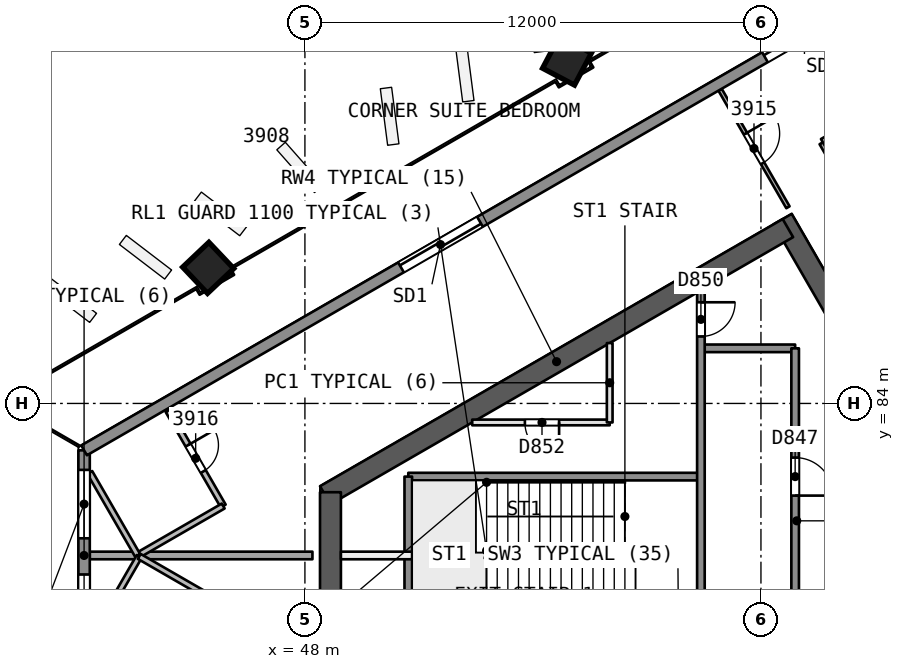
"""IFC4 building model, lengths in metres.
Left out: names, types, materials, properties, quantities, classifications, styles, units other than length and angle.
Written with IfcOpenShell. Run it as: python <this file> out.ifc"""

import sys

from ifc_helpers import new_model, si_unit, direction, frame, frame_2d, origin, origin_2d, place, context, subcontext, project, spatial, rectangle, extrude, element, fill, save


model = new_model("IFC4")
c1 = context("Model", 3, precision=1e-05, world=origin(), true_north=direction((0.0, 1.0)))
c2 = subcontext(c1, "Body", "Model", "MODEL_VIEW")
j1 = project(units=[si_unit("LENGTHUNIT", "METRE"), si_unit("PLANEANGLEUNIT", "RADIAN")], contexts=[c1])
p1 = place(None, origin())
s1 = spatial("IfcSite", under=j1, at=p1, CompositionType="ELEMENT")
p2 = place(p1, origin())
s2 = spatial("IfcBuilding", under=s1, at=p2, CompositionType="ELEMENT")
p3 = place(p2, frame((0.0, 0.0, 163.7)))
s3 = spatial("IfcBuildingStorey", under=s2, at=p3, CompositionType="ELEMENT", Elevation=163.7)
p4 = place(p3, frame((65.682, 80.0, 0.0), z_axis=(0.0, 0.0, 1.0), x_axis=(-0.500000202252, 0.866025287014, 0.0)))
e1 = element("IfcWall", 1, at=p4, inside=s3, PredefinedType="SHEAR", context=c2, shape_type="SweptSolid", body=[
    extrude(rectangle(XDim=10.221, YDim=0.55, at=frame_2d((5.111, 0.0))), origin(), (0.0, 0.0, 1.0), 3.7),
])
p5 = place(p4, frame((0.791, 0.0, 0.0)))
e2 = element("IfcOpeningElement", 2, at=p5, cuts=e1, PredefinedType="OPENING", context=c2, shape_type="SweptSolid", body=[
    extrude(rectangle(XDim=1.2, YDim=2.1, at=frame_2d((0.6, 1.05))), frame((0.0, 0.286, 0.0), z_axis=(0.0, -1.0, 0.0), x_axis=(1.0, 0.0, 0.0)), (0.0, 0.0, 1.0), 0.571),
])
p6 = place(p3, frame((60.709, 88.614, 0.0), z_axis=(0.0, 0.0, 1.0), x_axis=(-0.866020164116, -0.500009075263, 0.0)))
e3 = element("IfcWall", 3, at=p6, inside=s3, PredefinedType="SHEAR", context=c2, shape_type="SweptSolid", body=[
    extrude(rectangle(XDim=14.058, YDim=0.55, at=frame_2d((7.029, 0.0))), origin(), (0.0, 0.0, 1.0), 3.7),
])
p7 = place(p3, frame((48.672, 81.664, 0.0), z_axis=(0.0, 0.0, 1.0), x_axis=(0.0, -1.0, 0.0)))
e4 = element("IfcWall", 4, at=p7, inside=s3, PredefinedType="SHEAR", context=c2, shape_type="SweptSolid", body=[
    extrude(rectangle(XDim=3.487, YDim=0.55, at=frame_2d((1.743, 0.0))), origin(), (0.0, 0.0, 1.0), 3.7),
])
p8 = place(p3, frame((60.709, 71.386, 0.0), z_axis=(0.0, 0.0, 1.0), x_axis=(0.500015938302, 0.866016201606, 0.0)))
e5 = element("IfcWall", 5, at=p8, inside=s3, PredefinedType="SHEAR", context=c2, shape_type="SweptSolid", body=[
    extrude(rectangle(XDim=10.105, YDim=0.55, at=frame_2d((5.053, 0.0))), origin(), (0.0, 0.0, 1.0), 3.7),
])
p9 = place(p8, frame((7.955, 0.0, 0.0)))
e6 = element("IfcOpeningElement", 6, at=p9, cuts=e5, PredefinedType="OPENING", context=c2, shape_type="SweptSolid", body=[
    extrude(rectangle(XDim=1.2, YDim=2.1, at=frame_2d((0.6, 1.05))), frame((0.0, 0.286, 0.0), z_axis=(0.0, -1.0, 0.0), x_axis=(1.0, 0.0, 0.0)), (0.0, 0.0, 1.0), 0.571),
])
p10 = place(p3, frame((54.873, 93.033, 0.0), z_axis=(0.019328516974, -0.012138044789, 0.999739504221), x_axis=(-0.500205614953, 0.865671455024, 0.020181048691)))
e7 = element("IfcColumn", 7, at=p10, inside=s3, PredefinedType="COLUMN", context=c2, shape_type="SweptSolid", body=[
    extrude(rectangle(XDim=0.95, YDim=0.95, at=origin_2d()), origin(), (0.0, 0.0, 1.0), 3.701),
])
p11 = place(p3, frame((45.421, 87.576, 0.0), z_axis=(0.028559101991, -0.006859460986, 0.999568569678), x_axis=(-0.49850746064, 0.866650252321, 0.020190389752)))
e8 = element("IfcColumn", 8, at=p11, inside=s3, PredefinedType="COLUMN", context=c2, shape_type="SweptSolid", body=[
    extrude(rectangle(XDim=0.95, YDim=0.95, at=origin_2d()), origin(), (0.0, 0.0, 1.0), 3.702),
])
p12 = place(p3, frame((58.924, 92.256, 0.0), z_axis=(0.0, 0.0, 1.0), x_axis=(0.4999827131, -0.866035384151, 0.0)))
e9 = element("IfcWall", 9, at=p12, inside=s3, PredefinedType="PARTITIONING", context=c2, shape_type="SweptSolid", body=[
    extrude(rectangle(XDim=3.573, YDim=0.1, at=frame_2d((1.787, 0.0))), origin(), (0.0, 0.0, 1.0), 3.25),
])
p13 = place(p12, frame((1.336, 0.0, 0.0)))
e10 = element("IfcOpeningElement", 10, at=p13, cuts=e9, PredefinedType="OPENING", context=c2, shape_type="SweptSolid", body=[
    extrude(rectangle(XDim=0.9, YDim=2.1, at=frame_2d((0.45, 1.05))), frame((0.0, 0.061, 0.0), z_axis=(0.0, -1.0, 0.0), x_axis=(1.0, 0.0, 0.0)), (0.0, 0.0, 1.0), 0.121),
])
p14 = place(p3, frame((66.129, 83.077, 0.0), z_axis=(0.0, 0.0, 1.0), x_axis=(-0.5000018851, 0.866024315419, 0.0)))
e11 = element("IfcWall", 11, at=p14, inside=s3, PredefinedType="PARTITIONING", context=c2, shape_type="SweptSolid", body=[
    extrude(rectangle(XDim=9.0, YDim=0.2, at=frame_2d((4.5, 0.0))), origin(), (0.0, 0.0, 1.0), 3.25),
])
p15 = place(p3, frame((61.629, 90.871, 0.0), z_axis=(0.0, 0.0, 1.0), x_axis=(0.866041268327, 0.499972520799, 0.0)))
e12 = element("IfcWall", 12, at=p15, inside=s3, PredefinedType="PARTITIONING", context=c2, shape_type="SweptSolid", body=[
    extrude(rectangle(XDim=2.0, YDim=0.2, at=frame_2d((1.0, 0.0))), origin(), (0.0, 0.0, 1.0), 3.25),
])
p16 = place(p3, frame((44.4, 83.812, 0.0), z_axis=(0.0, 0.0, 1.0), x_axis=(0.50005036918, -0.865996321171, 0.0)))
e13 = element("IfcWall", 13, at=p16, inside=s3, PredefinedType="PARTITIONING", context=c2, shape_type="SweptSolid", body=[
    extrude(rectangle(XDim=2.9, YDim=0.15, at=frame_2d((1.45, 0.0))), origin(), (0.0, 0.0, 1.0), 3.25),
])
p17 = place(p16, frame((1.05, 0.0, 0.0)))
e14 = element("IfcOpeningElement", 14, at=p17, cuts=e13, PredefinedType="OPENING", context=c2, shape_type="SweptSolid", body=[
    extrude(rectangle(XDim=0.8, YDim=2.1, at=frame_2d((0.4, 1.05))), frame((0.0, 0.085, 0.0), z_axis=(0.0, -1.0, 0.0), x_axis=(1.0, 0.0, 0.0)), (0.0, 0.0, 1.0), 0.171),
])
p18 = place(p3, frame((45.85, 81.301, 0.0), z_axis=(0.0, 0.0, 1.0), x_axis=(-0.866021400173, -0.500006934395, 0.0)))
e15 = element("IfcWall", 15, at=p18, inside=s3, PredefinedType="PARTITIONING", context=c2, shape_type="SweptSolid", body=[
    extrude(rectangle(XDim=2.6, YDim=0.15, at=frame_2d((1.3, 0.0))), origin(), (0.0, 0.0, 1.0), 3.25),
])
p19 = place(p3, frame((43.598, 80.001, 0.0), z_axis=(0.0, 0.0, 1.0), x_axis=(-0.500024252353, 0.866011401229, 0.0)))
e16 = element("IfcWall", 16, at=p19, inside=s3, PredefinedType="PARTITIONING", context=c2, shape_type="SweptSolid", body=[
    extrude(rectangle(XDim=2.521, YDim=0.15, at=frame_2d((1.26, 0.0))), origin(), (0.0, 0.0, 1.0), 3.25),
])
p20 = place(p3, frame((42.338, 80.0, 0.0), z_axis=(0.0, 0.0, 1.0), x_axis=(1.0, 0.0, 0.0)))
e17 = element("IfcWall", 17, at=p20, inside=s3, PredefinedType="PARTITIONING", context=c2, shape_type="SweptSolid", body=[
    extrude(rectangle(XDim=5.86, YDim=0.2, at=frame_2d((2.93, 0.0))), origin(), (0.0, 0.0, 1.0), 3.25),
])
p21 = place(p3, frame((42.338, 77.718, 0.0), z_axis=(0.0, 0.0, 1.0), x_axis=(0.499998180979, 0.866026453994, 0.0)))
e18 = element("IfcWall", 18, at=p21, inside=s3, PredefinedType="PARTITIONING", context=c2, shape_type="SweptSolid", body=[
    extrude(rectangle(XDim=2.606, YDim=0.15, at=frame_2d((1.303, 0.0))), origin(), (0.0, 0.0, 1.0), 3.25),
])
p22 = place(p3, frame((43.641, 79.975, 0.0), z_axis=(0.0, 0.0, 1.0), x_axis=(0.866021400173, -0.500006934395, 0.0)))
e19 = element("IfcWall", 19, at=p22, inside=s3, PredefinedType="PARTITIONING", context=c2, shape_type="SweptSolid", body=[
    extrude(rectangle(XDim=2.6, YDim=0.15, at=frame_2d((1.3, 0.0))), origin(), (0.0, 0.0, 1.0), 3.25),
])
p23 = place(p3, frame((42.189, 77.234, 0.0), z_axis=(0.0, 0.0, 1.0), x_axis=(0.0, 1.0, 0.0)))
e20 = element("IfcWall", 20, at=p23, inside=s3, PredefinedType="SOLIDWALL", context=c2, shape_type="SweptSolid", body=[
    extrude(rectangle(XDim=5.532, YDim=0.3, at=frame_2d((2.766, 0.0))), origin(), (0.0, 0.0, 1.0), 3.25),
])
p24 = place(p23, frame((3.217, 0.0, 0.9)))
e21 = element("IfcOpeningElement", 21, at=p24, cuts=e20, PredefinedType="OPENING", context=c2, shape_type="SweptSolid", body=[
    extrude(rectangle(XDim=1.8, YDim=1.5, at=frame_2d((0.9, 0.75))), frame((0.0, 0.161, 0.0), z_axis=(0.0, -1.0, 0.0), x_axis=(1.0, 0.0, 0.0)), (0.0, 0.0, 1.0), 0.321),
])
p25 = place(p23, frame((0.465, 0.0, 0.9)))
e22 = element("IfcOpeningElement", 22, at=p25, cuts=e20, PredefinedType="OPENING", context=c2, shape_type="SweptSolid", body=[
    extrude(rectangle(XDim=1.8, YDim=1.5, at=frame_2d((0.9, 0.75))), frame((0.0, 0.161, 0.0), z_axis=(0.0, -1.0, 0.0), x_axis=(1.0, 0.0, 0.0)), (0.0, 0.0, 1.0), 0.321),
])
p26 = place(p3, frame((42.189, 82.766, 0.0), z_axis=(0.0, 0.0, 1.0), x_axis=(0.866025862562, 0.499999205373, 0.0)))
e23 = element("IfcWall", 23, at=p26, inside=s3, PredefinedType="SOLIDWALL", context=c2, shape_type="SweptSolid", body=[
    extrude(rectangle(XDim=54.064, YDim=0.3, at=frame_2d((27.032, 0.0))), origin(), (0.0, 0.0, 1.0), 3.25),
])
p27 = place(p26, frame((20.688, 0.0, 0.0)))
e24 = element("IfcOpeningElement", 24, at=p27, cuts=e23, PredefinedType="OPENING", context=c2, shape_type="SweptSolid", body=[
    extrude(rectangle(XDim=2.4, YDim=2.4, at=frame_2d((1.2, 1.2))), frame((0.0, 0.161, 0.0), z_axis=(0.0, -1.0, 0.0), x_axis=(1.0, 0.0, 0.0)), (0.0, 0.0, 1.0), 0.321),
])
p28 = place(p26, frame((9.629, 0.0, 0.0)))
e25 = element("IfcOpeningElement", 25, at=p28, cuts=e23, PredefinedType="OPENING", context=c2, shape_type="SweptSolid", body=[
    extrude(rectangle(XDim=2.4, YDim=2.4, at=frame_2d((1.2, 1.2))), frame((0.0, 0.161, 0.0), z_axis=(0.0, -1.0, 0.0), x_axis=(1.0, 0.0, 0.0)), (0.0, 0.0, 1.0), 0.321),
])
p29 = place(p26, frame((40.951, 0.0, 0.0)))
e26 = element("IfcOpeningElement", 26, at=p29, cuts=e23, PredefinedType="OPENING", context=c2, shape_type="SweptSolid", body=[
    extrude(rectangle(XDim=2.4, YDim=2.4, at=frame_2d((1.2, 1.2))), frame((0.0, 0.161, 0.0), z_axis=(0.0, -1.0, 0.0), x_axis=(1.0, 0.0, 0.0)), (0.0, 0.0, 1.0), 0.321),
])
p30 = place(p26, frame((27.847, 0.0, 0.9)))
e27 = element("IfcOpeningElement", 27, at=p30, cuts=e23, PredefinedType="OPENING", context=c2, shape_type="SweptSolid", body=[
    extrude(rectangle(XDim=1.8, YDim=1.5, at=frame_2d((0.9, 0.75))), frame((0.0, 0.161, 0.0), z_axis=(0.0, -1.0, 0.0), x_axis=(1.0, 0.0, 0.0)), (0.0, 0.0, 1.0), 0.321),
])
p31 = place(p26, frame((25.041, 0.0, 0.9)))
e28 = element("IfcOpeningElement", 28, at=p31, cuts=e23, PredefinedType="OPENING", context=c2, shape_type="SweptSolid", body=[
    extrude(rectangle(XDim=1.8, YDim=1.5, at=frame_2d((0.9, 0.75))), frame((0.0, 0.161, 0.0), z_axis=(0.0, -1.0, 0.0), x_axis=(1.0, 0.0, 0.0)), (0.0, 0.0, 1.0), 0.321),
])
p32 = place(p3, frame((60.9, 85.45, 0.0), z_axis=(0.0, 0.0, 1.0), x_axis=(-1.0, 0.0, 0.0)))
e29 = element("IfcWall", 29, at=p32, inside=s3, PredefinedType="SOLIDWALL", context=c2, shape_type="SweptSolid", body=[
    extrude(rectangle(XDim=2.48, YDim=0.2, at=frame_2d((1.24, 0.0))), origin(), (0.0, 0.0, 1.0), 3.25),
])
p33 = place(p3, frame((56.02, 83.5, 0.0), z_axis=(0.0, 0.0, 1.0), x_axis=(-1.0, 0.0, 0.0)))
e30 = element("IfcWall", 30, at=p33, inside=s3, PredefinedType="PARTITIONING", context=c2, shape_type="SweptSolid", body=[
    extrude(rectangle(XDim=3.618, YDim=0.15, at=frame_2d((1.809, 0.0))), origin(), (0.0, 0.0, 1.0), 3.25),
])
p34 = place(p33, frame((1.332, 0.0, 0.0)))
e31 = element("IfcOpeningElement", 31, at=p34, cuts=e30, PredefinedType="OPENING", context=c2, shape_type="SweptSolid", body=[
    extrude(rectangle(XDim=0.9, YDim=2.1, at=frame_2d((0.45, 1.05))), frame((0.0, 0.085, 0.0), z_axis=(0.0, -1.0, 0.0), x_axis=(1.0, 0.0, 0.0)), (0.0, 0.0, 1.0), 0.171),
])
p35 = place(p3, frame((58.42, 82.075, 0.0), z_axis=(0.0, 0.0, 1.0), x_axis=(-1.0, 0.0, 0.0)))
e32 = element("IfcWall", 32, at=p35, inside=s3, PredefinedType="SOLIDWALL", context=c2, shape_type="SweptSolid", body=[
    extrude(rectangle(XDim=7.7, YDim=0.2, at=frame_2d((3.85, 0.0))), origin(), (0.0, 0.0, 1.0), 3.25),
])
p36 = place(p3, frame((50.82, 80.0, 0.0), z_axis=(0.0, 0.0, 1.0), x_axis=(-1.0, 0.0, 0.0)))
e33 = element("IfcWall", 33, at=p36, inside=s3, PredefinedType="PARTITIONING", context=c2, shape_type="SweptSolid", body=[
    extrude(rectangle(XDim=1.873, YDim=0.2, at=frame_2d((0.937, 0.0))), origin(), (0.0, 0.0, 1.0), 3.25),
])
p37 = place(p3, frame((60.9, 85.45, 0.0), z_axis=(0.0, 0.0, 1.0), x_axis=(0.0, -1.0, 0.0)))
e34 = element("IfcWall", 34, at=p37, inside=s3, PredefinedType="SOLIDWALL", context=c2, shape_type="SweptSolid", body=[
    extrude(rectangle(XDim=10.9, YDim=0.2, at=frame_2d((5.45, 0.0))), origin(), (0.0, 0.0, 1.0), 3.25),
])
p38 = place(p37, frame((2.875, 0.0, 0.0)))
e35 = element("IfcOpeningElement", 35, at=p38, cuts=e34, PredefinedType="OPENING", context=c2, shape_type="SweptSolid", body=[
    extrude(rectangle(XDim=1.0, YDim=2.1, at=frame_2d((0.5, 1.05))), frame((0.0, 0.11, 0.0), z_axis=(0.0, -1.0, 0.0), x_axis=(1.0, 0.0, 0.0)), (0.0, 0.0, 1.0), 0.221),
])
p39 = place(p37, frame((7.375, 0.0, 0.0)))
e36 = element("IfcOpeningElement", 36, at=p39, cuts=e34, PredefinedType="OPENING", context=c2, shape_type="SweptSolid", body=[
    extrude(rectangle(XDim=1.0, YDim=2.1, at=frame_2d((0.5, 1.05))), frame((0.0, 0.11, 0.0), z_axis=(0.0, -1.0, 0.0), x_axis=(1.0, 0.0, 0.0)), (0.0, 0.0, 1.0), 0.221),
])
p40 = place(p3, frame((58.42, 86.974, 0.0), z_axis=(0.0, 0.0, 1.0), x_axis=(0.0, -1.0, 0.0)))
e37 = element("IfcWall", 37, at=p40, inside=s3, PredefinedType="SOLIDWALL", context=c2, shape_type="SweptSolid", body=[
    extrude(rectangle(XDim=10.524, YDim=0.2, at=frame_2d((5.262, 0.0))), origin(), (0.0, 0.0, 1.0), 3.25),
])
p41 = place(p40, frame((0.312, 0.0, 0.0)))
e38 = element("IfcOpeningElement", 38, at=p41, cuts=e37, PredefinedType="OPENING", context=c2, shape_type="SweptSolid", body=[
    extrude(rectangle(XDim=0.9, YDim=2.1, at=frame_2d((0.45, 1.05))), frame((0.0, 0.11, 0.0), z_axis=(0.0, -1.0, 0.0), x_axis=(1.0, 0.0, 0.0)), (0.0, 0.0, 1.0), 0.221),
])
p42 = place(p3, frame((56.02, 85.589, 0.0), z_axis=(0.0, 0.0, 1.0), x_axis=(0.0, -1.0, 0.0)))
e39 = element("IfcWall", 39, at=p42, inside=s3, PredefinedType="PARTITIONING", context=c2, shape_type="SweptSolid", body=[
    extrude(rectangle(XDim=2.089, YDim=0.15, at=frame_2d((1.044, 0.0))), origin(), (0.0, 0.0, 1.0), 3.25),
])
p43 = place(p3, frame((50.72, 82.075, 0.0), z_axis=(0.0, 0.0, 1.0), x_axis=(0.0, -1.0, 0.0)))
e40 = element("IfcWall", 40, at=p43, inside=s3, PredefinedType="SOLIDWALL", context=c2, shape_type="SweptSolid", body=[
    extrude(rectangle(XDim=4.15, YDim=0.2, at=frame_2d((2.075, 0.0))), origin(), (0.0, 0.0, 1.0), 3.25),
])
p44 = place(p13, origin())
e41 = element("IfcDoor", 41, at=p44, inside=s3, OperationType="SINGLE_SWING_LEFT", PredefinedType="NOTDEFINED", context=c2, shape_type="SweptSolid", body=[
    extrude(rectangle(XDim=0.9, YDim=2.1, at=frame_2d((0.45, 1.05))), frame((0.0, 0.025, 0.0), z_axis=(0.0, -1.0, 0.0), x_axis=(1.0, 0.0, 0.0)), (0.0, 0.0, 1.0), 0.05),
])
fill(e10, e41)
p45 = place(p17, origin())
e42 = element("IfcDoor", 42, at=p45, inside=s3, OperationType="SINGLE_SWING_LEFT", PredefinedType="NOTDEFINED", context=c2, shape_type="SweptSolid", body=[
    extrude(rectangle(XDim=0.8, YDim=2.1, at=frame_2d((0.4, 1.05))), frame((0.0, 0.025, 0.0), z_axis=(0.0, -1.0, 0.0), x_axis=(1.0, 0.0, 0.0)), (0.0, 0.0, 1.0), 0.05),
])
fill(e14, e42)
p46 = place(p24, origin())
e43 = element("IfcWindow", 43, at=p46, inside=s3, PartitioningType="SINGLE_PANEL", PredefinedType="WINDOW", context=c2, shape_type="SweptSolid", body=[
    extrude(rectangle(XDim=1.8, YDim=1.5, at=frame_2d((0.9, 0.75))), frame((0.0, 0.03, 0.0), z_axis=(0.0, -1.0, 0.0), x_axis=(1.0, 0.0, 0.0)), (0.0, 0.0, 1.0), 0.06),
])
fill(e21, e43)
p47 = place(p25, origin())
e44 = element("IfcWindow", 44, at=p47, inside=s3, PartitioningType="SINGLE_PANEL", PredefinedType="WINDOW", context=c2, shape_type="SweptSolid", body=[
    extrude(rectangle(XDim=1.8, YDim=1.5, at=frame_2d((0.9, 0.75))), frame((0.0, 0.03, 0.0), z_axis=(0.0, -1.0, 0.0), x_axis=(1.0, 0.0, 0.0)), (0.0, 0.0, 1.0), 0.06),
])
fill(e22, e44)
p48 = place(p27, origin())
e45 = element("IfcDoor", 45, at=p48, inside=s3, OperationType="SLIDING_TO_LEFT", PredefinedType="NOTDEFINED", context=c2, shape_type="SweptSolid", body=[
    extrude(rectangle(XDim=2.4, YDim=2.4, at=frame_2d((1.2, 1.2))), frame((0.0, 0.025, 0.0), z_axis=(0.0, -1.0, 0.0), x_axis=(1.0, 0.0, 0.0)), (0.0, 0.0, 1.0), 0.05),
])
fill(e24, e45)
p49 = place(p28, origin())
e46 = element("IfcDoor", 46, at=p49, inside=s3, OperationType="SLIDING_TO_RIGHT", PredefinedType="NOTDEFINED", context=c2, shape_type="SweptSolid", body=[
    extrude(rectangle(XDim=2.4, YDim=2.4, at=frame_2d((1.2, 1.2))), frame((0.0, 0.025, 0.0), z_axis=(0.0, -1.0, 0.0), x_axis=(1.0, 0.0, 0.0)), (0.0, 0.0, 1.0), 0.05),
])
fill(e25, e46)
p50 = place(p38, origin())
e47 = element("IfcDoor", 47, at=p50, inside=s3, OperationType="SINGLE_SWING_RIGHT", PredefinedType="NOTDEFINED", context=c2, shape_type="SweptSolid", body=[
    extrude(rectangle(XDim=1.0, YDim=2.1, at=frame_2d((0.5, 1.05))), frame((0.0, 0.025, 0.0), z_axis=(0.0, -1.0, 0.0), x_axis=(1.0, 0.0, 0.0)), (0.0, 0.0, 1.0), 0.05),
])
fill(e35, e47)
p51 = place(p41, origin())
e48 = element("IfcDoor", 48, at=p51, inside=s3, OperationType="SINGLE_SWING_LEFT", PredefinedType="NOTDEFINED", context=c2, shape_type="SweptSolid", body=[
    extrude(rectangle(XDim=0.9, YDim=2.1, at=frame_2d((0.45, 1.05))), frame((0.0, 0.025, 0.0), z_axis=(0.0, -1.0, 0.0), x_axis=(1.0, 0.0, 0.0)), (0.0, 0.0, 1.0), 0.05),
])
fill(e38, e48)
p52 = place(p34, origin())
e49 = element("IfcDoor", 49, at=p52, inside=s3, OperationType="SINGLE_SWING_LEFT", PredefinedType="NOTDEFINED", context=c2, shape_type="SweptSolid", body=[
    extrude(rectangle(XDim=0.9, YDim=2.1, at=frame_2d((0.45, 1.05))), frame((0.0, 0.025, 0.0), z_axis=(0.0, -1.0, 0.0), x_axis=(1.0, 0.0, 0.0)), (0.0, 0.0, 1.0), 0.05),
])
fill(e31, e49)
save(model, sys.argv[1])
